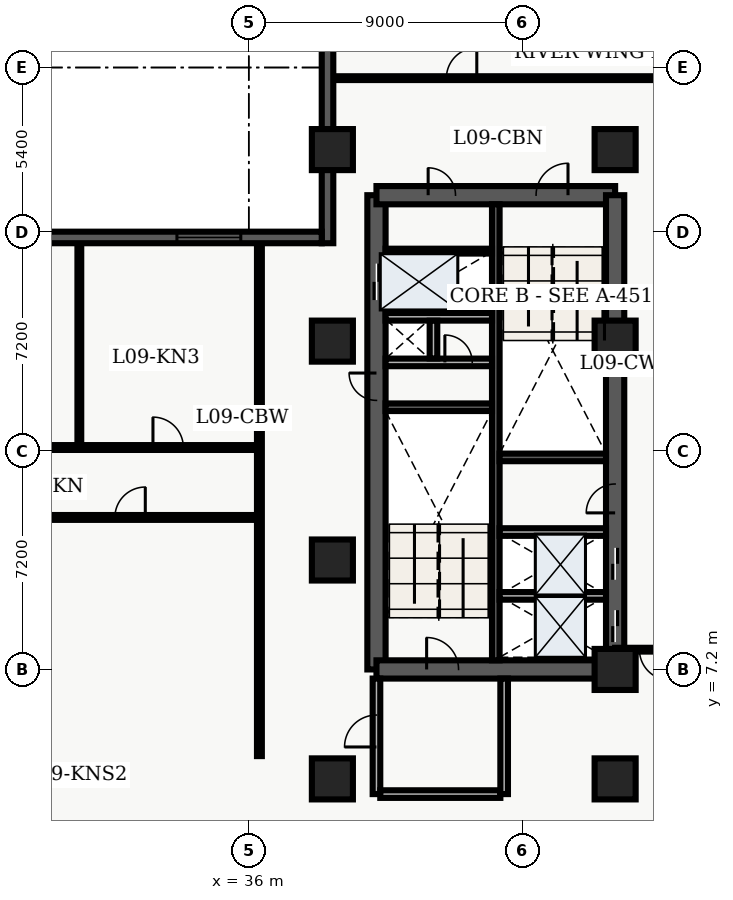
"""IFC4 building model, lengths in metres.
Left out: names, types, materials, properties, quantities, classifications, styles, units other than length and angle.
Written with IfcOpenShell. Run it as: python <this file> out.ifc"""

import sys

from ifc_helpers import new_model, entity, si_unit, converted_unit, direction, frame, origin_with_axes, origin_2d_with_axis, place, context, subcontext, project, spatial, polyline, rectangle, outline, extrude, element, fill, save


model = new_model("IFC4")
c1 = context("Model", 3, precision=1e-05, world=origin_with_axes(), true_north=direction((0.0, 1.0)))
c2 = subcontext(c1, "Body", "Model", "MODEL_VIEW")
j1 = project(units=[si_unit("LENGTHUNIT", "METRE"), converted_unit("PLANEANGLEUNIT", "DEGREE", entity("IfcPlaneAngleMeasure", 0.017), si_unit("PLANEANGLEUNIT", "RADIAN"), dimensions=[0, 0, 0, 0, 0, 0, 0])], contexts=[c1])
p1 = place(None, origin_with_axes())
s1 = spatial("IfcSite", under=j1, at=p1, CompositionType="ELEMENT")
p2 = place(p1, origin_with_axes())
s2 = spatial("IfcBuilding", under=s1, at=p2, CompositionType="ELEMENT")
p3 = place(p2, frame((0.0, 0.0, 40.5), z_axis=(0.0, 0.0, 1.0), x_axis=(1.0, 0.0, 0.0)))
s3 = spatial("IfcBuildingStorey", under=s2, at=p3, CompositionType="ELEMENT", Elevation=40.5)
p4 = place(p3, frame((40.2, 7.2, 0.0), z_axis=(0.0, 0.0, 1.0), x_axis=(0.0, 1.0, 0.0)))
e1 = element("IfcWall", 1, at=p4, inside=s3, PredefinedType="SHEAR", context=c2, shape_type="SweptSolid", body=[
    extrude(outline(polyline([(0.0, -0.3), (15.6, -0.3), (15.6, 0.3), (0.0, 0.3), (0.0, -0.3)])), origin_with_axes(), (0.0, 0.0, 1.0), 3.66),
])
p5 = place(p4, frame((12.75, 0.0, 0.0), z_axis=(0.0, 0.0, 1.0), x_axis=(1.0, 0.0, 0.0)))
e2 = element("IfcOpeningElement", 2, at=p5, cuts=e1, PredefinedType="OPENING", context=c2, shape_type="SweptSolid", body=[
    extrude(rectangle(XDim=1.2, YDim=0.62, at=origin_2d_with_axis()), origin_with_axes(), (0.0, 0.0, 1.0), 2.15),
])
p6 = place(p4, frame((9.3, 0.0, 0.0), z_axis=(0.0, 0.0, 1.0), x_axis=(1.0, 0.0, 0.0)))
e3 = element("IfcOpeningElement", 3, at=p6, cuts=e1, PredefinedType="OPENING", context=c2, shape_type="SweptSolid", body=[
    extrude(rectangle(XDim=0.9, YDim=0.62, at=origin_2d_with_axis()), origin_with_axes(), (0.0, 0.0, 1.0), 2.15),
])
p7 = place(p3, frame((40.2, 7.2, 0.0), z_axis=(0.0, 0.0, 1.0), x_axis=(1.0, 0.0, 0.0)))
e4 = element("IfcWall", 4, at=p7, inside=s3, PredefinedType="SHEAR", context=c2, shape_type="SweptSolid", body=[
    extrude(outline(polyline([(0.0, -0.3), (7.85, -0.3), (7.85, 0.3), (0.0, 0.3), (0.0, -0.3)])), origin_with_axes(), (0.0, 0.0, 1.0), 3.66),
])
p8 = place(p7, frame((2.175, 0.0, 0.0), z_axis=(0.0, 0.0, 1.0), x_axis=(1.0, 0.0, 0.0)))
e5 = element("IfcOpeningElement", 5, at=p8, cuts=e4, PredefinedType="OPENING", context=c2, shape_type="SweptSolid", body=[
    extrude(rectangle(XDim=1.05, YDim=0.62, at=origin_2d_with_axis()), origin_with_axes(), (0.0, 0.0, 1.0), 2.15),
])
p9 = place(p3, frame((40.2, 22.8, 0.0), z_axis=(0.0, 0.0, 1.0), x_axis=(1.0, 0.0, 0.0)))
e6 = element("IfcWall", 6, at=p9, inside=s3, PredefinedType="SHEAR", context=c2, shape_type="SweptSolid", body=[
    extrude(outline(polyline([(0.0, -0.3), (7.85, -0.3), (7.85, 0.3), (0.0, 0.3), (0.0, -0.3)])), origin_with_axes(), (0.0, 0.0, 1.0), 3.66),
])
p10 = place(p9, frame((5.775, 0.0, 0.0), z_axis=(0.0, 0.0, 1.0), x_axis=(1.0, 0.0, 0.0)))
e7 = element("IfcOpeningElement", 7, at=p10, cuts=e6, PredefinedType="OPENING", context=c2, shape_type="SweptSolid", body=[
    extrude(rectangle(XDim=1.05, YDim=0.62, at=origin_2d_with_axis()), origin_with_axes(), (0.0, 0.0, 1.0), 2.15),
])
p11 = place(p9, frame((2.15, 0.0, 0.0), z_axis=(0.0, 0.0, 1.0), x_axis=(1.0, 0.0, 0.0)))
e8 = element("IfcOpeningElement", 8, at=p11, cuts=e6, PredefinedType="OPENING", context=c2, shape_type="SweptSolid", body=[
    extrude(rectangle(XDim=0.9, YDim=0.62, at=origin_2d_with_axis()), origin_with_axes(), (0.0, 0.0, 1.0), 2.15),
])
p12 = place(p3, frame((48.05, 7.2, 0.0), z_axis=(0.0, 0.0, 1.0), x_axis=(0.0, 1.0, 0.0)))
e9 = element("IfcWall", 9, at=p12, inside=s3, PredefinedType="SHEAR", context=c2, shape_type="SweptSolid", body=[
    extrude(outline(polyline([(0.0, -0.3), (15.6, -0.3), (15.6, 0.3), (0.0, 0.3), (0.0, -0.3)])), origin_with_axes(), (0.0, 0.0, 1.0), 3.66),
])
p13 = place(p12, frame((1.425, 0.0, 0.0), z_axis=(0.0, 0.0, 1.0), x_axis=(1.0, 0.0, 0.0)))
e10 = element("IfcOpeningElement", 10, at=p13, cuts=e9, PredefinedType="OPENING", context=c2, shape_type="SweptSolid", body=[
    extrude(rectangle(XDim=1.05, YDim=0.62, at=origin_2d_with_axis()), origin_with_axes(), (0.0, 0.0, 1.0), 2.15),
])
p14 = place(p12, frame((3.475, 0.0, 0.0), z_axis=(0.0, 0.0, 1.0), x_axis=(1.0, 0.0, 0.0)))
e11 = element("IfcOpeningElement", 11, at=p14, cuts=e9, PredefinedType="OPENING", context=c2, shape_type="SweptSolid", body=[
    extrude(rectangle(XDim=1.05, YDim=0.62, at=origin_2d_with_axis()), origin_with_axes(), (0.0, 0.0, 1.0), 2.15),
])
p15 = place(p12, frame((5.625, 0.0, 0.0), z_axis=(0.0, 0.0, 1.0), x_axis=(1.0, 0.0, 0.0)))
e12 = element("IfcOpeningElement", 12, at=p15, cuts=e9, PredefinedType="OPENING", context=c2, shape_type="SweptSolid", body=[
    extrude(rectangle(XDim=0.95, YDim=0.62, at=origin_2d_with_axis()), origin_with_axes(), (0.0, 0.0, 1.0), 2.15),
])
p16 = place(p3, frame((44.125, 7.5, 0.0), z_axis=(0.0, 0.0, 1.0), x_axis=(0.0, 1.0, 0.0)))
e13 = element("IfcWall", 13, at=p16, inside=s3, PredefinedType="SHEAR", context=c2, shape_type="SweptSolid", body=[
    extrude(outline(polyline([(0.0, -0.125), (15.0, -0.125), (15.0, 0.125), (0.0, 0.125), (0.0, -0.125)])), origin_with_axes(), (0.0, 0.0, 1.0), 3.66),
])
for number, where, z_axis, x_axis in (
    (14, (40.5, 15.825, 0.0), (0.0, 0.0, 1.0), (1.0, 0.0, 0.0)),
    (15, (44.25, 14.175, 0.0), (0.0, 0.0, 1.0), (1.0, 0.0, 0.0)),
):
    element("IfcWall", number, at=place(p3, frame(where, z_axis=z_axis, x_axis=x_axis)), inside=s3, PredefinedType="SHEAR", context=c2, shape_type="SweptSolid", body=[
        extrude(outline(polyline([(0.0, -0.125), (3.5, -0.125), (3.5, 0.125), (0.0, 0.125), (0.0, -0.125)])), origin_with_axes(), (0.0, 0.0, 1.0), 3.66),
    ])
p17 = place(p3, frame((40.5, 17.3, 0.0), z_axis=(0.0, 0.0, 1.0), x_axis=(1.0, 0.0, 0.0)))
e16 = element("IfcWall", 16, at=p17, inside=s3, PredefinedType="SOLIDWALL", context=c2, shape_type="SweptSolid", body=[
    extrude(outline(polyline([(0.0, -0.125), (3.5, -0.125), (3.5, 0.125), (0.0, 0.125), (0.0, -0.125)])), origin_with_axes(), (0.0, 0.0, 1.0), 2.7),
])
p18 = place(p17, frame((2.4, 0.0, 0.0), z_axis=(0.0, 0.0, 1.0), x_axis=(1.0, 0.0, 0.0)))
e17 = element("IfcOpeningElement", 17, at=p18, cuts=e16, PredefinedType="OPENING", context=c2, shape_type="SweptSolid", body=[
    extrude(rectangle(XDim=0.9, YDim=0.27, at=origin_2d_with_axis()), origin_with_axes(), (0.0, 0.0, 1.0), 2.15),
])
p19 = place(p3, frame((40.5, 18.8, 0.0), z_axis=(0.0, 0.0, 1.0), x_axis=(1.0, 0.0, 0.0)))
e18 = element("IfcWall", 18, at=p19, inside=s3, PredefinedType="SOLIDWALL", context=c2, shape_type="SweptSolid", body=[
    extrude(outline(polyline([(0.0, -0.125), (3.5, -0.125), (3.5, 0.125), (0.0, 0.125), (0.0, -0.125)])), origin_with_axes(), (0.0, 0.0, 1.0), 2.7),
])
p20 = place(p3, frame((42.075, 17.43, 0.0), z_axis=(0.0, 0.0, 1.0), x_axis=(0.0, 1.0, 0.0)))
e19 = element("IfcWall", 19, at=p20, inside=s3, PredefinedType="SOLIDWALL", context=c2, shape_type="SweptSolid", body=[
    extrude(outline(polyline([(0.0, -0.125), (1.24, -0.125), (1.24, 0.125), (0.0, 0.125), (0.0, -0.125)])), origin_with_axes(), (0.0, 0.0, 1.0), 2.7),
])
p21 = place(p3, frame((40.2, 3.1, 0.0), z_axis=(0.0, 0.0, 1.0), x_axis=(0.0, 1.0, 0.0)))
e20 = element("IfcWall", 20, at=p21, inside=s3, PredefinedType="SOLIDWALL", context=c2, shape_type="SweptSolid", body=[
    extrude(outline(polyline([(0.0, -0.125), (3.8, -0.125), (3.8, 0.125), (0.0, 0.125), (0.0, -0.125)])), origin_with_axes(), (0.0, 0.0, 1.0), 2.7),
])
p22 = place(p21, frame((2.075, 0.0, 0.0), z_axis=(0.0, 0.0, 1.0), x_axis=(1.0, 0.0, 0.0)))
e21 = element("IfcOpeningElement", 21, at=p22, cuts=e20, PredefinedType="OPENING", context=c2, shape_type="SweptSolid", body=[
    extrude(rectangle(XDim=1.05, YDim=0.27, at=origin_2d_with_axis()), origin_with_axes(), (0.0, 0.0, 1.0), 2.15),
])
p23 = place(p3, frame((40.325, 3.1, 0.0), z_axis=(0.0, 0.0, 1.0), x_axis=(1.0, 0.0, 0.0)))
e22 = element("IfcWall", 22, at=p23, inside=s3, PredefinedType="SOLIDWALL", context=c2, shape_type="SweptSolid", body=[
    extrude(outline(polyline([(0.0, -0.125), (3.95, -0.125), (3.95, 0.125), (0.0, 0.125), (0.0, -0.125)])), origin_with_axes(), (0.0, 0.0, 1.0), 2.7),
])
p24 = place(p3, frame((44.4, 3.1, 0.0), z_axis=(0.0, 0.0, 1.0), x_axis=(0.0, 1.0, 0.0)))
e23 = element("IfcWall", 23, at=p24, inside=s3, PredefinedType="SOLIDWALL", context=c2, shape_type="SweptSolid", body=[
    extrude(outline(polyline([(0.0, -0.125), (3.8, -0.125), (3.8, 0.125), (0.0, 0.125), (0.0, -0.125)])), origin_with_axes(), (0.0, 0.0, 1.0), 2.7),
])
for number, where, z_axis, x_axis in (
    (24, (38.75, 3.6, 0.0), (0.0, 0.0, 1.0), (1.0, 0.0, 0.0)),
    (25, (38.75, 10.8, 0.0), (0.0, 0.0, 1.0), (1.0, 0.0, 0.0)),
    (26, (38.75, 18.0, 0.0), (0.0, 0.0, 1.0), (1.0, 0.0, 0.0)),
    (27, (38.75, 24.3, 0.0), (0.0, 0.0, 1.0), (1.0, 0.0, 0.0)),
    (28, (48.05, 3.6, 0.0), (0.0, 0.0, 1.0), (1.0, 0.0, 0.0)),
    (29, (48.05, 7.2, 0.0), (0.0, 0.0, 1.0), (1.0, 0.0, 0.0)),
    (30, (48.05, 18.0, 0.0), (0.0, 0.0, 1.0), (1.0, 0.0, 0.0)),
    (31, (48.05, 24.3, 0.0), (0.0, 0.0, 1.0), (1.0, 0.0, 0.0)),
):
    element("IfcColumn", number, at=place(p3, frame(where, z_axis=z_axis, x_axis=x_axis)), inside=s3, PredefinedType="COLUMN", context=c2, shape_type="SweptSolid", body=[
        extrude(rectangle(XDim=1.35, YDim=1.35, at=origin_2d_with_axis()), origin_with_axes(), (0.0, 0.0, 1.0), 3.9),
    ])
p25 = place(p3, frame((40.5, 20.96, 0.0), z_axis=(0.0, 0.0, 1.0), x_axis=(1.0, 0.0, 0.0)))
e32 = element("IfcWall", 32, at=p25, inside=s3, PredefinedType="PARTITIONING", context=c2, shape_type="SweptSolid", body=[
    extrude(outline(polyline([(0.0, -0.08), (3.5, -0.08), (3.5, 0.08), (0.0, 0.08), (0.0, -0.08)])), origin_with_axes(), (0.0, 0.0, 1.0), 2.7),
])
for number, where, z_axis, x_axis in (
    (33, (44.25, 9.62, 0.0), (0.0, 0.0, 1.0), (1.0, 0.0, 0.0)),
    (34, (44.25, 11.72, 0.0), (0.0, 0.0, 1.0), (1.0, 0.0, 0.0)),
):
    element("IfcWall", number, at=place(p3, frame(where, z_axis=z_axis, x_axis=x_axis)), inside=s3, PredefinedType="SOLIDWALL", context=c2, shape_type="SweptSolid", body=[
        extrude(outline(polyline([(0.0, -0.125), (3.5, -0.125), (3.5, 0.125), (0.0, 0.125), (0.0, -0.125)])), origin_with_axes(), (0.0, 0.0, 1.0), 2.7),
    ])
p26 = place(p3, frame((21.15, 12.2, 0.0), z_axis=(0.0, 0.0, 1.0), x_axis=(1.0, 0.0, 0.0)))
e35 = element("IfcWall", 35, at=p26, inside=s3, PredefinedType="PARTITIONING", context=c2, shape_type="SweptSolid", body=[
    extrude(outline(polyline([(0.0, -0.08), (15.2, -0.08), (15.2, 0.08), (0.0, 0.08), (0.0, -0.08)])), origin_with_axes(), (0.0, 0.0, 1.0), 2.7),
])
p27 = place(p26, frame((3.477, 0.0, 0.0), z_axis=(0.0, 0.0, 1.0), x_axis=(1.0, 0.0, 0.0)))
e36 = element("IfcOpeningElement", 36, at=p27, cuts=e35, PredefinedType="OPENING", context=c2, shape_type="SweptSolid", body=[
    extrude(rectangle(XDim=1.0, YDim=0.18, at=origin_2d_with_axis()), origin_with_axes(), (0.0, 0.0, 1.0), 2.15),
])
p28 = place(p26, frame((10.947, 0.0, 0.0), z_axis=(0.0, 0.0, 1.0), x_axis=(1.0, 0.0, 0.0)))
e37 = element("IfcOpeningElement", 37, at=p28, cuts=e35, PredefinedType="OPENING", context=c2, shape_type="SweptSolid", body=[
    extrude(rectangle(XDim=1.0, YDim=0.18, at=origin_2d_with_axis()), origin_with_axes(), (0.0, 0.0, 1.0), 2.15),
])
p29 = place(p3, frame((21.15, 14.5, 0.0), z_axis=(0.0, 0.0, 1.0), x_axis=(1.0, 0.0, 0.0)))
e38 = element("IfcWall", 38, at=p29, inside=s3, PredefinedType="PARTITIONING", context=c2, shape_type="SweptSolid", body=[
    extrude(outline(polyline([(0.0, -0.08), (15.2, -0.08), (15.2, 0.08), (0.0, 0.08), (0.0, -0.08)])), origin_with_axes(), (0.0, 0.0, 1.0), 2.7),
])
p30 = place(p29, frame((2.303, 0.0, 0.0), z_axis=(0.0, 0.0, 1.0), x_axis=(1.0, 0.0, 0.0)))
e39 = element("IfcOpeningElement", 39, at=p30, cuts=e38, PredefinedType="OPENING", context=c2, shape_type="SweptSolid", body=[
    extrude(rectangle(XDim=1.0, YDim=0.18, at=origin_2d_with_axis()), origin_with_axes(), (0.0, 0.0, 1.0), 2.15),
])
p31 = place(p29, frame((6.851, 0.0, 0.0), z_axis=(0.0, 0.0, 1.0), x_axis=(1.0, 0.0, 0.0)))
e40 = element("IfcOpeningElement", 40, at=p31, cuts=e38, PredefinedType="OPENING", context=c2, shape_type="SweptSolid", body=[
    extrude(rectangle(XDim=1.2, YDim=0.18, at=origin_2d_with_axis()), origin_with_axes(), (0.0, 0.0, 1.0), 2.2),
])
p32 = place(p29, frame((12.198, 0.0, 0.0), z_axis=(0.0, 0.0, 1.0), x_axis=(1.0, 0.0, 0.0)))
e41 = element("IfcOpeningElement", 41, at=p32, cuts=e38, PredefinedType="OPENING", context=c2, shape_type="SweptSolid", body=[
    extrude(rectangle(XDim=1.0, YDim=0.18, at=origin_2d_with_axis()), origin_with_axes(), (0.0, 0.0, 1.0), 2.15),
])
p33 = place(p3, frame((36.35, 4.35, 0.0), z_axis=(0.0, 0.0, 1.0), x_axis=(0.0, 1.0, 0.0)))
e42 = element("IfcWall", 42, at=p33, inside=s3, PredefinedType="PARTITIONING", context=c2, shape_type="SweptSolid", body=[
    extrude(outline(polyline([(0.0, -0.08), (16.95, -0.08), (16.95, 0.08), (0.0, 0.08), (0.0, -0.08)])), origin_with_axes(), (0.0, 0.0, 1.0), 2.7),
])
p34 = place(p3, frame((30.427, 14.62, 0.0), z_axis=(0.0, 0.0, 1.0), x_axis=(0.0, 1.0, 0.0)))
e43 = element("IfcWall", 43, at=p34, inside=s3, PredefinedType="PARTITIONING", context=c2, shape_type="SweptSolid", body=[
    extrude(outline(polyline([(0.0, -0.062), (6.605, -0.062), (6.605, 0.062), (0.0, 0.062), (0.0, -0.062)])), origin_with_axes(), (0.0, 0.0, 1.0), 2.7),
])
p35 = place(p3, frame((59.64, 7.85, 0.0), z_axis=(0.0, 0.0, 1.0), x_axis=(-1.0, 0.0, 0.0)))
e44 = element("IfcWall", 44, at=p35, inside=s3, PredefinedType="PARTITIONING", context=c2, shape_type="SweptSolid", body=[
    extrude(outline(polyline([(0.0, -0.062), (11.59, -0.062), (11.59, 0.062), (0.0, 0.062), (0.0, -0.062)])), origin_with_axes(), (0.0, 0.0, 1.0), 2.7),
])
p36 = place(p35, frame((10.29, 0.0, 0.0), z_axis=(0.0, 0.0, 1.0), x_axis=(1.0, 0.0, 0.0)))
e45 = element("IfcOpeningElement", 45, at=p36, cuts=e44, PredefinedType="OPENING", context=c2, shape_type="SweptSolid", body=[
    extrude(rectangle(XDim=1.0, YDim=0.145, at=origin_2d_with_axis()), origin_with_axes(), (0.0, 0.0, 1.0), 2.15),
])
p37 = place(p3, frame((38.76, 26.65, 0.0), z_axis=(0.0, 0.0, 1.0), x_axis=(1.0, 0.0, 0.0)))
e46 = element("IfcWall", 46, at=p37, inside=s3, PredefinedType="PARTITIONING", context=c2, shape_type="SweptSolid", body=[
    extrude(outline(polyline([(0.0, -0.062), (20.88, -0.062), (20.88, 0.062), (0.0, 0.062), (0.0, -0.062)])), origin_with_axes(), (0.0, 0.0, 1.0), 2.7),
])
p38 = place(p37, frame((4.24, 0.0, 0.0), z_axis=(0.0, 0.0, 1.0), x_axis=(1.0, 0.0, 0.0)))
e47 = element("IfcOpeningElement", 47, at=p38, cuts=e46, PredefinedType="OPENING", context=c2, shape_type="SweptSolid", body=[
    extrude(rectangle(XDim=1.0, YDim=0.145, at=origin_2d_with_axis()), origin_with_axes(), (0.0, 0.0, 1.0), 2.15),
])
p39 = place(p3, frame((38.59, 21.22, 0.0), z_axis=(0.0, 0.0, 1.0), x_axis=(0.0, 1.0, 0.0)))
e48 = element("IfcWall", 48, at=p39, inside=s3, PredefinedType="SOLIDWALL", context=c2, shape_type="SweptSolid", body=[
    extrude(outline(polyline([(0.0, -0.19), (7.58, -0.19), (7.58, 0.19), (0.0, 0.19), (0.0, -0.19)])), origin_with_axes(), (0.0, 0.0, 1.0), 3.66),
])
p40 = place(p3, frame((21.22, 21.41, 0.0), z_axis=(0.0, 0.0, 1.0), x_axis=(1.0, 0.0, 0.0)))
e49 = element("IfcWall", 49, at=p40, inside=s3, PredefinedType="SOLIDWALL", context=c2, shape_type="SweptSolid", body=[
    extrude(outline(polyline([(0.0, -0.19), (17.18, -0.19), (17.18, 0.19), (0.0, 0.19), (0.0, -0.19)])), origin_with_axes(), (0.0, 0.0, 1.0), 3.66),
])
p41 = place(p40, frame((2.413, 0.0, 0.45), z_axis=(0.0, 0.0, 1.0), x_axis=(1.0, 0.0, 0.0)))
e50 = element("IfcOpeningElement", 50, at=p41, cuts=e49, PredefinedType="OPENING", context=c2, shape_type="SweptSolid", body=[
    extrude(rectangle(XDim=2.1, YDim=0.4, at=origin_2d_with_axis()), origin_with_axes(), (0.0, 0.0, 1.0), 2.2),
])
p42 = place(p40, frame((13.467, 0.0, 0.45), z_axis=(0.0, 0.0, 1.0), x_axis=(1.0, 0.0, 0.0)))
e51 = element("IfcOpeningElement", 51, at=p42, cuts=e49, PredefinedType="OPENING", context=c2, shape_type="SweptSolid", body=[
    extrude(rectangle(XDim=2.1, YDim=0.4, at=origin_2d_with_axis()), origin_with_axes(), (0.0, 0.0, 1.0), 2.2),
])
p43 = place(p12, frame((1.425, 0.0, 0.0), z_axis=(0.0, 0.0, 1.0), x_axis=(1.0, 0.0, 0.0)))
e52 = element("IfcDoor", 52, at=p43, inside=s3, OperationType="SLIDING_TO_LEFT", PredefinedType="DOOR", context=c2, shape_type="SweptSolid", body=[
    extrude(rectangle(XDim=1.05, YDim=0.09, at=origin_2d_with_axis()), origin_with_axes(), (0.0, 0.0, 1.0), 2.15),
])
fill(e10, e52)
p44 = place(p12, frame((3.475, 0.0, 0.0), z_axis=(0.0, 0.0, 1.0), x_axis=(1.0, 0.0, 0.0)))
e53 = element("IfcDoor", 53, at=p44, inside=s3, OperationType="SLIDING_TO_RIGHT", PredefinedType="DOOR", context=c2, shape_type="SweptSolid", body=[
    extrude(rectangle(XDim=1.05, YDim=0.09, at=origin_2d_with_axis()), origin_with_axes(), (0.0, 0.0, 1.0), 2.15),
])
fill(e11, e53)
p45 = place(p4, frame((12.75, 0.0, 0.0), z_axis=(0.0, 0.0, 1.0), x_axis=(1.0, 0.0, 0.0)))
e54 = element("IfcDoor", 54, at=p45, inside=s3, OperationType="DOUBLE_DOOR_SLIDING", PredefinedType="DOOR", context=c2, shape_type="SweptSolid", body=[
    extrude(rectangle(XDim=1.2, YDim=0.09, at=origin_2d_with_axis()), origin_with_axes(), (0.0, 0.0, 1.0), 2.15),
])
fill(e2, e54)
p46 = place(p4, frame((9.3, 0.0, 0.0), z_axis=(0.0, 0.0, 1.0), x_axis=(1.0, 0.0, 0.0)))
e55 = element("IfcDoor", 55, at=p46, inside=s3, OperationType="SINGLE_SWING_RIGHT", PredefinedType="DOOR", context=c2, shape_type="SweptSolid", body=[
    extrude(rectangle(XDim=0.9, YDim=0.09, at=origin_2d_with_axis()), origin_with_axes(), (0.0, 0.0, 1.0), 2.15),
])
fill(e3, e55)
p47 = place(p17, frame((2.4, 0.0, 0.0), z_axis=(0.0, 0.0, 1.0), x_axis=(1.0, 0.0, 0.0)))
e56 = element("IfcDoor", 56, at=p47, inside=s3, OperationType="SINGLE_SWING_LEFT", PredefinedType="DOOR", context=c2, shape_type="SweptSolid", body=[
    extrude(rectangle(XDim=0.9, YDim=0.09, at=origin_2d_with_axis()), origin_with_axes(), (0.0, 0.0, 1.0), 2.15),
])
fill(e17, e56)
p48 = place(p7, frame((2.175, 0.0, 0.0), z_axis=(0.0, 0.0, 1.0), x_axis=(1.0, 0.0, 0.0)))
e57 = element("IfcDoor", 57, at=p48, inside=s3, OperationType="SINGLE_SWING_LEFT", PredefinedType="DOOR", context=c2, shape_type="SweptSolid", body=[
    extrude(rectangle(XDim=1.05, YDim=0.09, at=origin_2d_with_axis()), origin_with_axes(), (0.0, 0.0, 1.0), 2.15),
])
fill(e5, e57)
p49 = place(p9, frame((5.775, 0.0, 0.0), z_axis=(0.0, 0.0, 1.0), x_axis=(1.0, 0.0, 0.0)))
e58 = element("IfcDoor", 58, at=p49, inside=s3, OperationType="SINGLE_SWING_RIGHT", PredefinedType="DOOR", context=c2, shape_type="SweptSolid", body=[
    extrude(rectangle(XDim=1.05, YDim=0.09, at=origin_2d_with_axis()), origin_with_axes(), (0.0, 0.0, 1.0), 2.15),
])
fill(e7, e58)
p50 = place(p21, frame((2.075, 0.0, 0.0), z_axis=(0.0, 0.0, 1.0), x_axis=(1.0, 0.0, 0.0)))
e59 = element("IfcDoor", 59, at=p50, inside=s3, OperationType="SINGLE_SWING_LEFT", PredefinedType="DOOR", context=c2, shape_type="SweptSolid", body=[
    extrude(rectangle(XDim=1.05, YDim=0.09, at=origin_2d_with_axis()), origin_with_axes(), (0.0, 0.0, 1.0), 2.15),
])
fill(e21, e59)
p51 = place(p9, frame((2.15, 0.0, 0.0), z_axis=(0.0, 0.0, 1.0), x_axis=(1.0, 0.0, 0.0)))
e60 = element("IfcDoor", 60, at=p51, inside=s3, OperationType="SINGLE_SWING_LEFT", PredefinedType="DOOR", context=c2, shape_type="SweptSolid", body=[
    extrude(rectangle(XDim=0.9, YDim=0.09, at=origin_2d_with_axis()), origin_with_axes(), (0.0, 0.0, 1.0), 2.15),
])
fill(e8, e60)
p52 = place(p12, frame((5.625, 0.0, 0.0), z_axis=(0.0, 0.0, 1.0), x_axis=(1.0, 0.0, 0.0)))
e61 = element("IfcDoor", 61, at=p52, inside=s3, OperationType="SINGLE_SWING_LEFT", PredefinedType="DOOR", context=c2, shape_type="SweptSolid", body=[
    extrude(rectangle(XDim=0.95, YDim=0.09, at=origin_2d_with_axis()), origin_with_axes(), (0.0, 0.0, 1.0), 2.15),
])
fill(e12, e61)
p53 = place(p26, frame((10.947, 0.0, 0.0), z_axis=(0.0, 0.0, 1.0), x_axis=(1.0, 0.0, 0.0)))
e62 = element("IfcDoor", 62, at=p53, inside=s3, OperationType="SINGLE_SWING_RIGHT", PredefinedType="DOOR", context=c2, shape_type="SweptSolid", body=[
    extrude(rectangle(XDim=1.0, YDim=0.09, at=origin_2d_with_axis()), origin_with_axes(), (0.0, 0.0, 1.0), 2.15),
])
fill(e37, e62)
p54 = place(p29, frame((12.198, 0.0, 0.0), z_axis=(0.0, 0.0, 1.0), x_axis=(1.0, 0.0, 0.0)))
e63 = element("IfcDoor", 63, at=p54, inside=s3, OperationType="SINGLE_SWING_LEFT", PredefinedType="DOOR", context=c2, shape_type="SweptSolid", body=[
    extrude(rectangle(XDim=1.0, YDim=0.09, at=origin_2d_with_axis()), origin_with_axes(), (0.0, 0.0, 1.0), 2.15),
])
fill(e41, e63)
p55 = place(p35, frame((10.29, 0.0, 0.0), z_axis=(0.0, 0.0, 1.0), x_axis=(1.0, 0.0, 0.0)))
e64 = element("IfcDoor", 64, at=p55, inside=s3, OperationType="SINGLE_SWING_LEFT", PredefinedType="DOOR", context=c2, shape_type="SweptSolid", body=[
    extrude(rectangle(XDim=1.0, YDim=0.075, at=origin_2d_with_axis()), origin_with_axes(), (0.0, 0.0, 1.0), 2.15),
])
fill(e45, e64)
p56 = place(p37, frame((4.24, 0.0, 0.0), z_axis=(0.0, 0.0, 1.0), x_axis=(1.0, 0.0, 0.0)))
e65 = element("IfcDoor", 65, at=p56, inside=s3, OperationType="SINGLE_SWING_RIGHT", PredefinedType="DOOR", context=c2, shape_type="SweptSolid", body=[
    extrude(rectangle(XDim=1.0, YDim=0.075, at=origin_2d_with_axis()), origin_with_axes(), (0.0, 0.0, 1.0), 2.15),
])
fill(e47, e65)
p57 = place(p40, frame((13.467, 0.0, 0.45), z_axis=(0.0, 0.0, 1.0), x_axis=(1.0, 0.0, 0.0)))
e66 = element("IfcWindow", 66, at=p57, inside=s3, PredefinedType="WINDOW", context=c2, shape_type="SweptSolid", body=[
    extrude(rectangle(XDim=2.1, YDim=0.09, at=origin_2d_with_axis()), origin_with_axes(), (0.0, 0.0, 1.0), 2.2),
])
fill(e51, e66)
save(model, sys.argv[1])
